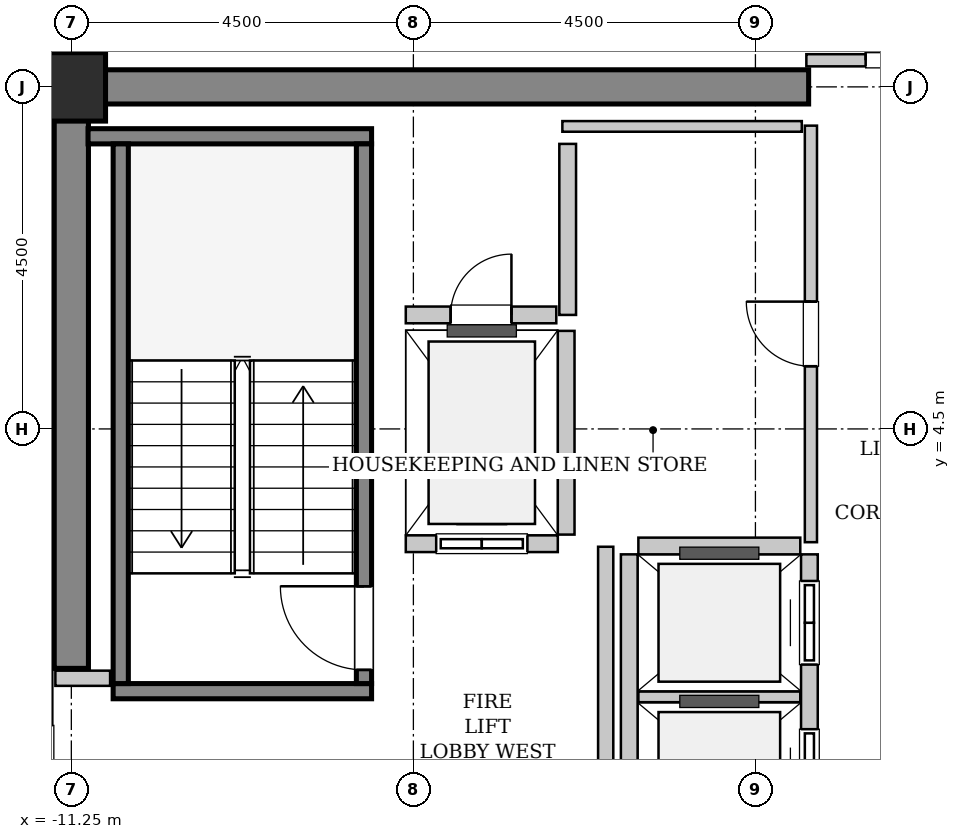
"""IFC4 building model, lengths in metres.
Left out: names, types, materials, properties, quantities, classifications, styles, units other than length and angle.
Written with IfcOpenShell. Run it as: python <this file> out.ifc"""

import sys

from ifc_helpers import new_model, si_unit, direction, frame, frame_2d, origin, origin_2d, place, context, subcontext, project, spatial, rectangle, extrude, source, transform, mapped, element, fill, save


model = new_model("IFC4")
c1 = context("Model", 3, precision=1e-05, world=origin(), true_north=direction((0.0, 1.0)))
c2 = subcontext(c1, "Body", "Model", "MODEL_VIEW")
j1 = project(units=[si_unit("LENGTHUNIT", "METRE"), si_unit("PLANEANGLEUNIT", "RADIAN")], contexts=[c1])
p1 = place(None, origin())
s1 = spatial("IfcSite", under=j1, at=p1, CompositionType="ELEMENT")
p2 = place(p1, origin())
s2 = spatial("IfcBuilding", under=s1, at=p2, CompositionType="ELEMENT")
p3 = place(p2, frame((0.0, 0.0, 302.6)))
s3 = spatial("IfcBuildingStorey", under=s2, at=p3, CompositionType="ELEMENT", Elevation=302.6)
m1 = source(origin(), c2, "Body", "SweptSolid", [
    extrude(rectangle(XDim=9.925, YDim=0.45, at=frame_2d((4.962, 0.0))), origin(), (0.0, 0.0, 1.0), 3.8),
])
p4 = place(p3, frame((-11.475, 9.0, 0.0), z_axis=(0.0, 0.0, 1.0), x_axis=(1.0, 0.0, 0.0)))
e1 = element("IfcWall", 1, at=p4, inside=s3, PredefinedType="SHEAR", context=c2, shape_type="MappedRepresentation", body=[
    mapped(m1, transform((0.0, 0.0, 0.0), x_axis=(1.0, 0.0, 0.0), y_axis=(0.0, 1.0, 0.0), z_axis=(0.0, 0.0, 1.0), scale=1.0)),
])
m2 = source(origin(), c2, "Body", "SweptSolid", [
    extrude(rectangle(XDim=7.425, YDim=0.45, at=frame_2d((3.712, 0.0))), origin(), (0.0, 0.0, 1.0), 3.8),
])
p5 = place(p3, frame((-11.25, 1.35, 0.0), z_axis=(0.0, 0.0, 1.0), x_axis=(0.0, 1.0, 0.0)))
e2 = element("IfcWall", 2, at=p5, inside=s3, PredefinedType="SHEAR", context=c2, shape_type="MappedRepresentation", body=[
    mapped(m2, transform((0.0, 0.0, 0.0), x_axis=(1.0, 0.0, 0.0), y_axis=(0.0, 1.0, 0.0), z_axis=(0.0, 0.0, 1.0), scale=1.0)),
])
m3 = source(origin(), c2, "Body", "SweptSolid", [
    extrude(rectangle(XDim=0.9, YDim=0.9, at=origin_2d()), origin(), (0.0, 0.0, 1.0), 3.8),
])
p6 = place(p3, frame((-11.25, 9.0, 0.0), z_axis=(0.0, 0.0, 1.0), x_axis=(1.0, 0.0, 0.0)))
e3 = element("IfcColumn", 3, at=p6, inside=s3, PredefinedType="COLUMN", context=c2, shape_type="MappedRepresentation", body=[
    mapped(m3, transform((0.0, 0.0, 0.0), x_axis=(1.0, 0.0, 0.0), y_axis=(0.0, 1.0, 0.0), z_axis=(0.0, 0.0, 1.0), scale=1.0)),
])
m4 = source(origin(), c2, "Body", "SweptSolid", [
    extrude(rectangle(XDim=3.4, YDim=0.2, at=frame_2d((1.7, 0.0))), origin(), (0.0, 0.0, 1.0), 3.8),
])
p7 = place(p3, frame((-7.3, 1.05, 0.0), z_axis=(0.0, 0.0, 1.0), x_axis=(-1.0, 0.0, 0.0)))
e4 = element("IfcWall", 4, at=p7, inside=s3, PredefinedType="SOLIDWALL", context=c2, shape_type="MappedRepresentation", body=[
    mapped(m4, transform((0.0, 0.0, 0.0), x_axis=(1.0, 0.0, 0.0), y_axis=(0.0, 1.0, 0.0), z_axis=(0.0, 0.0, 1.0), scale=1.0)),
])
m5 = source(origin(), c2, "Body", "SweptSolid", [
    extrude(rectangle(XDim=3.73, YDim=0.2, at=frame_2d((1.865, 0.0))), origin(), (0.0, 0.0, 1.0), 3.8),
])
p8 = place(p3, frame((-7.3, 8.35, 0.0), z_axis=(0.0, 0.0, 1.0), x_axis=(-1.0, 0.0, 0.0)))
e5 = element("IfcWall", 5, at=p8, inside=s3, PredefinedType="SOLIDWALL", context=c2, shape_type="MappedRepresentation", body=[
    mapped(m5, transform((0.0, 0.0, 0.0), x_axis=(1.0, 0.0, 0.0), y_axis=(0.0, 1.0, 0.0), z_axis=(0.0, 0.0, 1.0), scale=1.0)),
])
m6 = source(origin(), c2, "Body", "SweptSolid", [
    extrude(rectangle(XDim=7.1, YDim=0.2, at=frame_2d((3.55, 0.0))), origin(), (0.0, 0.0, 1.0), 3.8),
])
p9 = place(p3, frame((-7.4, 1.15, 0.0), z_axis=(0.0, 0.0, 1.0), x_axis=(0.0, 1.0, 0.0)))
e6 = element("IfcWall", 6, at=p9, inside=s3, PredefinedType="SOLIDWALL", context=c2, shape_type="MappedRepresentation", body=[
    mapped(m6, transform((0.0, 0.0, 0.0), x_axis=(1.0, 0.0, 0.0), y_axis=(0.0, 1.0, 0.0), z_axis=(0.0, 0.0, 1.0), scale=1.0)),
])
p10 = place(p9, frame((0.18, 0.0, 0.0)))
e7 = element("IfcOpeningElement", 7, at=p10, cuts=e6, PredefinedType="OPENING", context=c2, shape_type="SweptSolid", body=[
    extrude(rectangle(XDim=1.1, YDim=2.15, at=frame_2d((0.55, 1.075))), frame((0.0, 0.11, 0.0), z_axis=(0.0, -1.0, 0.0), x_axis=(1.0, 0.0, 0.0)), (0.0, 0.0, 1.0), 0.22),
])
p11 = place(p3, frame((-10.6, 1.15, 0.0), z_axis=(0.0, 0.0, 1.0), x_axis=(0.0, 1.0, 0.0)))
e8 = element("IfcWall", 8, at=p11, inside=s3, PredefinedType="SOLIDWALL", context=c2, shape_type="MappedRepresentation", body=[
    mapped(m6, transform((0.0, 0.0, 0.0), x_axis=(1.0, 0.0, 0.0), y_axis=(0.0, 1.0, 0.0), z_axis=(0.0, 0.0, 1.0), scale=1.0)),
])
m7 = source(origin(), c2, "Body", "SweptSolid", [
    extrude(rectangle(XDim=2.0, YDim=0.22, at=frame_2d((1.0, 0.0))), origin(), (0.0, 0.0, 1.0), 3.535),
])
p12 = place(p3, frame((-6.85, 2.99, 0.0), z_axis=(0.0, 0.0, 1.0), x_axis=(1.0, 0.0, 0.0)))
e9 = element("IfcWall", 9, at=p12, inside=s3, PredefinedType="SOLIDWALL", context=c2, shape_type="MappedRepresentation", body=[
    mapped(m7, transform((0.0, 0.0, 0.0), x_axis=(1.0, 0.0, 0.0), y_axis=(0.0, 1.0, 0.0), z_axis=(0.0, 0.0, 1.0), scale=1.0)),
])
p13 = place(p12, frame((0.4, 0.0, 0.0)))
e10 = element("IfcOpeningElement", 10, at=p13, cuts=e9, PredefinedType="OPENING", context=c2, shape_type="SweptSolid", body=[
    extrude(rectangle(XDim=1.2, YDim=2.2, at=frame_2d((0.6, 1.1))), frame((0.0, 0.12, 0.0), z_axis=(0.0, -1.0, 0.0), x_axis=(1.0, 0.0, 0.0)), (0.0, 0.0, 1.0), 0.24),
])
m8 = source(origin(), c2, "Body", "SweptSolid", [
    extrude(rectangle(XDim=2.68, YDim=0.22, at=frame_2d((1.34, 0.0))), origin(), (0.0, 0.0, 1.0), 3.535),
])
p14 = place(p3, frame((-4.74, 3.11, 0.0), z_axis=(0.0, 0.0, 1.0), x_axis=(0.0, 1.0, 0.0)))
e11 = element("IfcWall", 11, at=p14, inside=s3, PredefinedType="SOLIDWALL", context=c2, shape_type="MappedRepresentation", body=[
    mapped(m8, transform((0.0, 0.0, 0.0), x_axis=(1.0, 0.0, 0.0), y_axis=(0.0, 1.0, 0.0), z_axis=(0.0, 0.0, 1.0), scale=1.0)),
])
m9 = source(origin(), c2, "Body", "SweptSolid", [
    extrude(rectangle(XDim=5.7, YDim=0.22, at=frame_2d((2.85, 0.0))), origin(), (0.0, 0.0, 1.0), 3.535),
])
p15 = place(p3, frame((-1.54, -2.85, 0.0), z_axis=(0.0, 0.0, 1.0), x_axis=(0.0, 1.0, 0.0)))
e12 = element("IfcWall", 12, at=p15, inside=s3, PredefinedType="SOLIDWALL", context=c2, shape_type="MappedRepresentation", body=[
    mapped(m9, transform((0.0, 0.0, 0.0), x_axis=(1.0, 0.0, 0.0), y_axis=(0.0, 1.0, 0.0), z_axis=(0.0, 0.0, 1.0), scale=1.0)),
])
p16 = place(p15, frame((0.35, 0.0, 0.0)))
e13 = element("IfcOpeningElement", 13, at=p16, cuts=e12, PredefinedType="OPENING", context=c2, shape_type="SweptSolid", body=[
    extrude(rectangle(XDim=1.1, YDim=2.2, at=frame_2d((0.55, 1.1))), frame((0.0, 0.12, 0.0), z_axis=(0.0, -1.0, 0.0), x_axis=(1.0, 0.0, 0.0)), (0.0, 0.0, 1.0), 0.24),
])
p17 = place(p15, frame((2.3, 0.0, 0.0)))
e14 = element("IfcOpeningElement", 14, at=p17, cuts=e12, PredefinedType="OPENING", context=c2, shape_type="SweptSolid", body=[
    extrude(rectangle(XDim=1.1, YDim=2.2, at=frame_2d((0.55, 1.1))), frame((0.0, 0.12, 0.0), z_axis=(0.0, -1.0, 0.0), x_axis=(1.0, 0.0, 0.0)), (0.0, 0.0, 1.0), 0.24),
])
p18 = place(p15, frame((4.25, 0.0, 0.0)))
e15 = element("IfcOpeningElement", 15, at=p18, cuts=e12, PredefinedType="OPENING", context=c2, shape_type="SweptSolid", body=[
    extrude(rectangle(XDim=1.1, YDim=2.2, at=frame_2d((0.55, 1.1))), frame((0.0, 0.12, 0.0), z_axis=(0.0, -1.0, 0.0), x_axis=(1.0, 0.0, 0.0)), (0.0, 0.0, 1.0), 0.24),
])
p19 = place(p3, frame((-3.91, 2.85, 0.0), z_axis=(0.0, 0.0, 1.0), x_axis=(0.0, -1.0, 0.0)))
e16 = element("IfcWall", 16, at=p19, inside=s3, PredefinedType="SOLIDWALL", context=c2, shape_type="MappedRepresentation", body=[
    mapped(m9, transform((0.0, 0.0, 0.0), x_axis=(1.0, 0.0, 0.0), y_axis=(0.0, 1.0, 0.0), z_axis=(0.0, 0.0, 1.0), scale=1.0)),
])
m10 = source(origin(), c2, "Body", "SweptSolid", [
    extrude(rectangle(XDim=2.13, YDim=0.14, at=frame_2d((1.065, 0.0))), origin(), (0.0, 0.0, 1.0), 3.535),
])
p20 = place(p3, frame((-3.79, 0.975, 0.0), z_axis=(0.0, 0.0, 1.0), x_axis=(1.0, 0.0, 0.0)))
e17 = element("IfcWall", 17, at=p20, inside=s3, PredefinedType="PARTITIONING", context=c2, shape_type="MappedRepresentation", body=[
    mapped(m10, transform((0.0, 0.0, 0.0), x_axis=(1.0, 0.0, 0.0), y_axis=(0.0, 1.0, 0.0), z_axis=(0.0, 0.0, 1.0), scale=1.0)),
])
m11 = source(origin(), c2, "Body", "SweptSolid", [
    extrude(rectangle(XDim=2.13, YDim=0.22, at=frame_2d((1.065, 0.0))), origin(), (0.0, 0.0, 1.0), 3.535),
])
p21 = place(p3, frame((-1.66, 2.96, 0.0), z_axis=(0.0, 0.0, 1.0), x_axis=(-1.0, 0.0, 0.0)))
e18 = element("IfcWall", 18, at=p21, inside=s3, PredefinedType="SOLIDWALL", context=c2, shape_type="MappedRepresentation", body=[
    mapped(m11, transform((0.0, 0.0, 0.0), x_axis=(1.0, 0.0, 0.0), y_axis=(0.0, 1.0, 0.0), z_axis=(0.0, 0.0, 1.0), scale=1.0)),
])
m12 = source(origin(), c2, "Body", "SweptSolid", [
    extrude(rectangle(XDim=2.25, YDim=0.22, at=frame_2d((1.125, 0.0))), origin(), (0.0, 0.0, 1.0), 3.535),
])
p22 = place(p3, frame((-4.72, 6.0, 0.0), z_axis=(0.0, 0.0, 1.0), x_axis=(0.0, 1.0, 0.0)))
e19 = element("IfcWall", 19, at=p22, inside=s3, PredefinedType="SOLIDWALL", context=c2, shape_type="MappedRepresentation", body=[
    mapped(m12, transform((0.0, 0.0, 0.0), x_axis=(1.0, 0.0, 0.0), y_axis=(0.0, 1.0, 0.0), z_axis=(0.0, 0.0, 1.0), scale=1.0)),
])
m13 = source(origin(), c2, "Body", "SweptSolid", [
    extrude(rectangle(XDim=1.98, YDim=0.22, at=frame_2d((0.99, 0.0))), origin(), (0.0, 0.0, 1.0), 3.535),
])
p23 = place(p3, frame((-6.85, 6.0, 0.0), z_axis=(0.0, 0.0, 1.0), x_axis=(1.0, 0.0, 0.0)))
e20 = element("IfcWall", 20, at=p23, inside=s3, PredefinedType="SOLIDWALL", context=c2, shape_type="MappedRepresentation", body=[
    mapped(m13, transform((0.0, 0.0, 0.0), x_axis=(1.0, 0.0, 0.0), y_axis=(0.0, 1.0, 0.0), z_axis=(0.0, 0.0, 1.0), scale=1.0)),
])
p24 = place(p23, frame((0.59, 0.0, 0.0)))
e21 = element("IfcOpeningElement", 21, at=p24, cuts=e20, PredefinedType="OPENING", context=c2, shape_type="SweptSolid", body=[
    extrude(rectangle(XDim=0.8, YDim=2.0, at=frame_2d((0.4, 1.0))), frame((0.0, 0.12, 0.0), z_axis=(0.0, -1.0, 0.0), x_axis=(1.0, 0.0, 0.0)), (0.0, 0.0, 1.0), 0.24),
])
m14 = source(origin(), c2, "Body", "SweptSolid", [
    extrude(rectangle(XDim=5.9, YDim=0.2, at=frame_2d((2.95, 0.0))), origin(), (0.0, 0.0, 1.0), 3.535),
])
p25 = place(p3, frame((-4.22, -2.95, 0.0), z_axis=(0.0, 0.0, 1.0), x_axis=(0.0, 1.0, 0.0)))
e22 = element("IfcWall", 22, at=p25, inside=s3, PredefinedType="PARTITIONING", context=c2, shape_type="MappedRepresentation", body=[
    mapped(m14, transform((0.0, 0.0, 0.0), x_axis=(1.0, 0.0, 0.0), y_axis=(0.0, 1.0, 0.0), z_axis=(0.0, 0.0, 1.0), scale=1.0)),
])
m15 = source(origin(), c2, "Body", "SweptSolid", [
    extrude(rectangle(XDim=0.72, YDim=0.2, at=frame_2d((0.36, 0.0))), origin(), (0.0, 0.0, 1.0), 3.535),
])
p26 = place(p3, frame((-11.46, 1.22, 0.0), z_axis=(0.0, 0.0, 1.0), x_axis=(1.0, 0.0, 0.0)))
e23 = element("IfcWall", 23, at=p26, inside=s3, PredefinedType="PARTITIONING", context=c2, shape_type="MappedRepresentation", body=[
    mapped(m15, transform((0.0, 0.0, 0.0), x_axis=(1.0, 0.0, 0.0), y_axis=(0.0, 1.0, 0.0), z_axis=(0.0, 0.0, 1.0), scale=1.0)),
])
m16 = source(origin(), c2, "Body", "SweptSolid", [
    extrude(rectangle(XDim=3.16, YDim=0.16, at=frame_2d((1.58, 0.0))), origin(), (0.0, 0.0, 1.0), 2.625),
])
p27 = place(p3, frame((-1.58, 9.35, 0.0), z_axis=(0.0, 0.0, 1.0), x_axis=(1.0, 0.0, 0.0)))
e24 = element("IfcWall", 24, at=p27, inside=s3, PredefinedType="PARTITIONING", context=c2, shape_type="MappedRepresentation", body=[
    mapped(m16, transform((0.0, 0.0, 0.0), x_axis=(1.0, 0.0, 0.0), y_axis=(0.0, 1.0, 0.0), z_axis=(0.0, 0.0, 1.0), scale=1.0)),
])
p28 = place(p27, frame((0.78, 0.0, 0.0)))
e25 = element("IfcOpeningElement", 25, at=p28, cuts=e24, PredefinedType="OPENING", context=c2, shape_type="SweptSolid", body=[
    extrude(rectangle(XDim=1.6, YDim=2.3, at=frame_2d((0.8, 1.15))), frame((0.0, 0.09, 0.0), z_axis=(0.0, -1.0, 0.0), x_axis=(1.0, 0.0, 0.0)), (0.0, 0.0, 1.0), 0.18),
])
m17 = source(origin(), c2, "Body", "SweptSolid", [
    extrude(rectangle(XDim=5.48, YDim=0.16, at=frame_2d((2.74, 0.0))), origin(), (0.0, 0.0, 1.0), 3.535),
])
p29 = place(p3, frame((-1.52, 3.01, 0.0), z_axis=(0.0, 0.0, 1.0), x_axis=(0.0, 1.0, 0.0)))
e26 = element("IfcWall", 26, at=p29, inside=s3, PredefinedType="PARTITIONING", context=c2, shape_type="MappedRepresentation", body=[
    mapped(m17, transform((0.0, 0.0, 0.0), x_axis=(1.0, 0.0, 0.0), y_axis=(0.0, 1.0, 0.0), z_axis=(0.0, 0.0, 1.0), scale=1.0)),
])
p30 = place(p29, frame((2.315, 0.0, 0.0)))
e27 = element("IfcOpeningElement", 27, at=p30, cuts=e26, PredefinedType="OPENING", context=c2, shape_type="SweptSolid", body=[
    extrude(rectangle(XDim=0.85, YDim=2.1, at=frame_2d((0.425, 1.05))), frame((0.0, 0.09, 0.0), z_axis=(0.0, -1.0, 0.0), x_axis=(1.0, 0.0, 0.0)), (0.0, 0.0, 1.0), 0.18),
])
m18 = source(origin(), c2, "Body", "SweptSolid", [
    extrude(rectangle(XDim=3.15, YDim=0.14, at=frame_2d((1.575, 0.0))), origin(), (0.0, 0.0, 1.0), 3.535),
])
p31 = place(p3, frame((-4.79, 8.48, 0.0), z_axis=(0.0, 0.0, 1.0), x_axis=(1.0, 0.0, 0.0)))
e28 = element("IfcWall", 28, at=p31, inside=s3, PredefinedType="PARTITIONING", context=c2, shape_type="MappedRepresentation", body=[
    mapped(m18, transform((0.0, 0.0, 0.0), x_axis=(1.0, 0.0, 0.0), y_axis=(0.0, 1.0, 0.0), z_axis=(0.0, 0.0, 1.0), scale=1.0)),
])
m19 = source(origin(), c2, "Body", "SweptSolid", [
    extrude(rectangle(XDim=1.1, YDim=2.15, at=frame_2d((0.55, 1.075))), frame((0.0, 0.025, 0.0), z_axis=(0.0, -1.0, 0.0), x_axis=(1.0, 0.0, 0.0)), (0.0, 0.0, 1.0), 0.05),
])
p32 = place(p10, origin())
e29 = element("IfcDoor", 29, at=p32, inside=s3, OperationType="SINGLE_SWING_RIGHT", PredefinedType="DOOR", context=c2, shape_type="MappedRepresentation", body=[
    mapped(m19, transform((0.0, 0.0, 0.0), x_axis=(1.0, 0.0, 0.0), y_axis=(0.0, 1.0, 0.0), z_axis=(0.0, 0.0, 1.0), scale=1.0)),
])
fill(e7, e29)
m20 = source(origin(), c2, "Body", "SweptSolid", [
    extrude(rectangle(XDim=1.2, YDim=2.2, at=frame_2d((0.6, 1.1))), frame((0.0, 0.025, 0.0), z_axis=(0.0, -1.0, 0.0), x_axis=(1.0, 0.0, 0.0)), (0.0, 0.0, 1.0), 0.05),
])
p33 = place(p13, origin())
e30 = element("IfcDoor", 30, at=p33, inside=s3, OperationType="SLIDING_TO_LEFT", PredefinedType="DOOR", context=c2, shape_type="MappedRepresentation", body=[
    mapped(m20, transform((0.0, 0.0, 0.0), x_axis=(1.0, 0.0, 0.0), y_axis=(0.0, 1.0, 0.0), z_axis=(0.0, 0.0, 1.0), scale=1.0)),
])
fill(e10, e30)
m21 = source(origin(), c2, "Body", "SweptSolid", [
    extrude(rectangle(XDim=1.1, YDim=2.2, at=frame_2d((0.55, 1.1))), frame((0.0, 0.025, 0.0), z_axis=(0.0, -1.0, 0.0), x_axis=(1.0, 0.0, 0.0)), (0.0, 0.0, 1.0), 0.05),
])
p34 = place(p17, origin())
e31 = element("IfcDoor", 31, at=p34, inside=s3, OperationType="DOUBLE_DOOR_SLIDING", PredefinedType="DOOR", context=c2, shape_type="MappedRepresentation", body=[
    mapped(m21, transform((0.0, 0.0, 0.0), x_axis=(1.0, 0.0, 0.0), y_axis=(0.0, 1.0, 0.0), z_axis=(0.0, 0.0, 1.0), scale=1.0)),
])
fill(e14, e31)
p35 = place(p18, origin())
e32 = element("IfcDoor", 32, at=p35, inside=s3, OperationType="DOUBLE_DOOR_SLIDING", PredefinedType="DOOR", context=c2, shape_type="MappedRepresentation", body=[
    mapped(m21, transform((0.0, 0.0, 0.0), x_axis=(1.0, 0.0, 0.0), y_axis=(0.0, 1.0, 0.0), z_axis=(0.0, 0.0, 1.0), scale=1.0)),
])
fill(e15, e32)
m22 = source(origin(), c2, "Body", "SweptSolid", [
    extrude(rectangle(XDim=0.8, YDim=2.0, at=frame_2d((0.4, 1.0))), frame((0.0, 0.025, 0.0), z_axis=(0.0, -1.0, 0.0), x_axis=(1.0, 0.0, 0.0)), (0.0, 0.0, 1.0), 0.05),
])
p36 = place(p24, origin())
e33 = element("IfcDoor", 33, at=p36, inside=s3, OperationType="SINGLE_SWING_RIGHT", PredefinedType="TRAPDOOR", context=c2, shape_type="MappedRepresentation", body=[
    mapped(m22, transform((0.0, 0.0, 0.0), x_axis=(1.0, 0.0, 0.0), y_axis=(0.0, 1.0, 0.0), z_axis=(0.0, 0.0, 1.0), scale=1.0)),
])
fill(e21, e33)
m23 = source(origin(), c2, "Body", "SweptSolid", [
    extrude(rectangle(XDim=1.6, YDim=2.3, at=frame_2d((0.8, 1.15))), frame((0.0, 0.025, 0.0), z_axis=(0.0, -1.0, 0.0), x_axis=(1.0, 0.0, 0.0)), (0.0, 0.0, 1.0), 0.05),
])
p37 = place(p28, origin())
e34 = element("IfcDoor", 34, at=p37, inside=s3, OperationType="DOUBLE_DOOR_SINGLE_SWING", PredefinedType="DOOR", context=c2, shape_type="MappedRepresentation", body=[
    mapped(m23, transform((0.0, 0.0, 0.0), x_axis=(1.0, 0.0, 0.0), y_axis=(0.0, 1.0, 0.0), z_axis=(0.0, 0.0, 1.0), scale=1.0)),
])
fill(e25, e34)
m24 = source(origin(), c2, "Body", "SweptSolid", [
    extrude(rectangle(XDim=0.85, YDim=2.1, at=frame_2d((0.425, 1.05))), frame((0.0, 0.025, 0.0), z_axis=(0.0, -1.0, 0.0), x_axis=(1.0, 0.0, 0.0)), (0.0, 0.0, 1.0), 0.05),
])
p38 = place(p30, origin())
e35 = element("IfcDoor", 35, at=p38, inside=s3, OperationType="SINGLE_SWING_RIGHT", PredefinedType="DOOR", context=c2, shape_type="MappedRepresentation", body=[
    mapped(m24, transform((0.0, 0.0, 0.0), x_axis=(1.0, 0.0, 0.0), y_axis=(0.0, 1.0, 0.0), z_axis=(0.0, 0.0, 1.0), scale=1.0)),
])
fill(e27, e35)
save(model, sys.argv[1])
